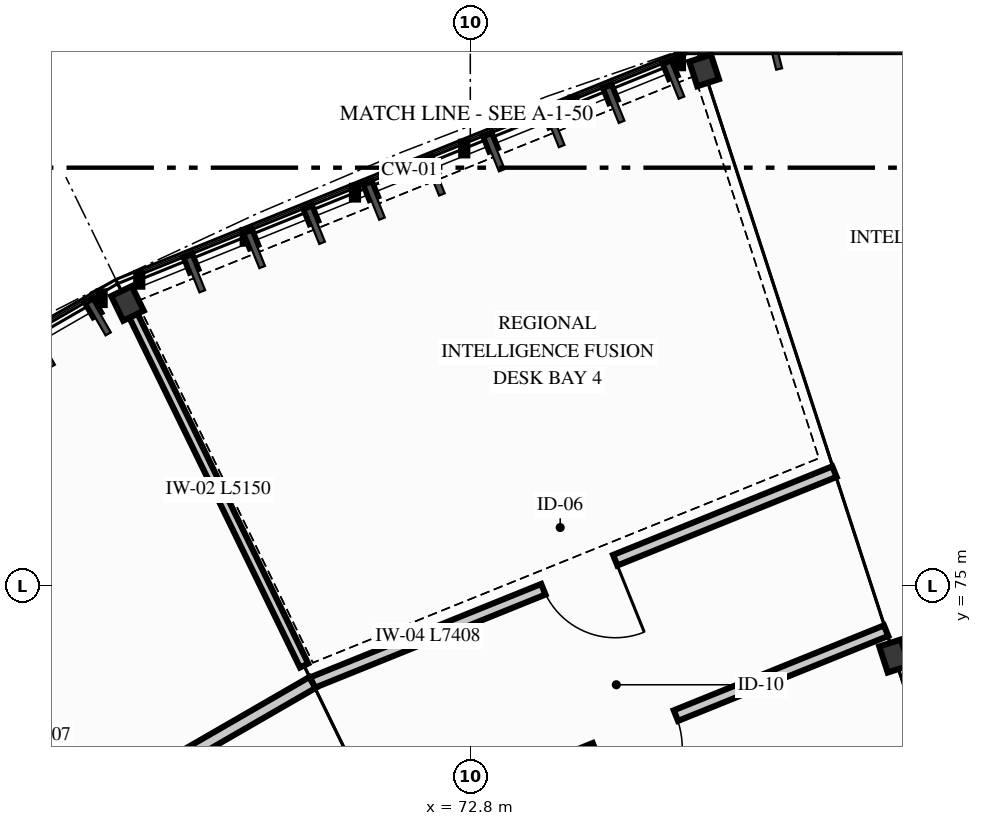
"""IFC4 building model, lengths in metres.
Left out: names, types, materials, properties, quantities, classifications, styles, units other than length and angle.
Written with IfcOpenShell. Run it as: python <this file> out.ifc"""

import sys

from ifc_helpers import new_model, si_unit, direction, frame, frame_2d, origin, origin_2d, place, context, subcontext, project, spatial, rectangle, i_section, extrude, element, fill, save


model = new_model("IFC4")
c1 = context("Model", 3, precision=1e-05, world=origin(), true_north=direction((0.0, 1.0)))
c2 = subcontext(c1, "Body", "Model", "MODEL_VIEW")
j1 = project(units=[si_unit("LENGTHUNIT", "METRE"), si_unit("PLANEANGLEUNIT", "RADIAN")], contexts=[c1])
p1 = place(None, origin())
s1 = spatial("IfcSite", under=j1, at=p1, CompositionType="ELEMENT")
p2 = place(p1, origin())
s2 = spatial("IfcBuilding", under=s1, at=p2, CompositionType="ELEMENT")
p3 = place(p2, frame((0.0, 0.0, 17.7)))
s3 = spatial("IfcBuildingStorey", under=s2, at=p3, CompositionType="ELEMENT", Elevation=17.7)
p4 = place(p3, frame((78.379, 74.076, 0.0), z_axis=(0.0, 0.0, 1.0), x_axis=(0.951056516295, 0.309016994375, 0.0)))
e1 = element("IfcColumn", 1, at=p4, inside=s3, PredefinedType="COLUMN", context=c2, shape_type="SweptSolid", body=[
    extrude(i_section(OverallWidth=0.3, OverallDepth=0.36, WebThickness=0.012, FlangeThickness=0.022, FilletRadius=0.027, at=origin_2d()), origin(), (0.0, 0.0, 1.0), 3.9),
])
p5 = place(p3, frame((75.876, 81.78, 0.0), z_axis=(0.0, 0.0, 1.0), x_axis=(0.951056516295, 0.309016994375, 0.0)))
e2 = element("IfcColumn", 2, at=p5, inside=s3, PredefinedType="COLUMN", context=c2, shape_type="SweptSolid", body=[
    extrude(i_section(OverallWidth=0.3, OverallDepth=0.34, WebThickness=0.012, FlangeThickness=0.021, FilletRadius=0.027, at=origin_2d()), origin(), (0.0, 0.0, 1.0), 3.9),
])
p6 = place(p3, frame((68.29, 78.714, 0.0), z_axis=(0.0, 0.0, 1.0), x_axis=(0.898794046299, 0.438371146789, 0.0)))
e3 = element("IfcColumn", 3, at=p6, inside=s3, PredefinedType="COLUMN", context=c2, shape_type="SweptSolid", body=[
    extrude(i_section(OverallWidth=0.3, OverallDepth=0.36, WebThickness=0.012, FlangeThickness=0.022, FilletRadius=0.027, at=origin_2d()), origin(), (0.0, 0.0, 1.0), 3.9),
])
p7 = place(p3, frame((78.271, 74.409, 0.0), z_axis=(0.0, 0.0, 1.0), x_axis=(-0.927181218568, -0.374613117677, 0.0)))
e4 = element("IfcWall", 4, at=p7, inside=s3, PredefinedType="PARTITIONING", context=c2, shape_type="SweptSolid", body=[
    extrude(rectangle(XDim=7.101, YDim=0.15, at=frame_2d((3.551, 0.0))), origin(), (0.0, 0.0, 1.0), 3.68),
])
p8 = place(p7, frame((2.983, 0.0, 0.0)))
e5 = element("IfcOpeningElement", 5, at=p8, cuts=e4, PredefinedType="OPENING", context=c2, shape_type="SweptSolid", body=[
    extrude(rectangle(XDim=1.15, YDim=2.2, at=frame_2d((0.575, 1.1))), frame((0.0, 0.085, 0.0), z_axis=(0.0, -1.0, 0.0), x_axis=(1.0, 0.0, 0.0)), (0.0, 0.0, 1.0), 0.17),
])
p9 = place(p3, frame((77.591, 76.501, 0.0), z_axis=(0.0, 0.0, 1.0), x_axis=(-0.927187035022, -0.374598721418, 0.0)))
e6 = element("IfcWall", 6, at=p9, inside=s3, PredefinedType="PARTITIONING", context=c2, shape_type="SweptSolid", body=[
    extrude(rectangle(XDim=7.408, YDim=0.15, at=frame_2d((3.704, 0.0))), origin(), (0.0, 0.0, 1.0), 3.68),
])
p10 = place(p9, frame((3.111, 0.0, 0.0)))
e7 = element("IfcOpeningElement", 7, at=p10, cuts=e6, PredefinedType="OPENING", context=c2, shape_type="SweptSolid", body=[
    extrude(rectangle(XDim=1.02, YDim=2.18, at=frame_2d((0.51, 1.09))), frame((0.0, 0.085, 0.0), z_axis=(0.0, -1.0, 0.0), x_axis=(1.0, 0.0, 0.0)), (0.0, 0.0, 1.0), 0.17),
])
p11 = place(p3, frame((70.613, 73.951, 0.0), z_axis=(0.0, 0.0, 1.0), x_axis=(-0.438355450259, 0.898801701839, 0.0)))
e8 = element("IfcWall", 8, at=p11, inside=s3, PredefinedType="PARTITIONING", context=c2, shape_type="SweptSolid", body=[
    extrude(rectangle(XDim=5.15, YDim=0.12, at=frame_2d((2.575, 0.0))), origin(), (0.0, 0.0, 1.0), 3.25),
])
p12 = place(p3, frame((70.722, 73.726, 0.0), z_axis=(0.0, 0.0, 1.0), x_axis=(-0.866019843608, -0.500009630384, 0.0)))
e9 = element("IfcWall", 9, at=p12, inside=s3, PredefinedType="PARTITIONING", context=c2, shape_type="SweptSolid", body=[
    extrude(rectangle(XDim=7.408, YDim=0.165, at=frame_2d((3.704, 0.0))), origin(), (0.0, 0.0, 1.0), 3.68),
])
p13 = place(p12, frame((3.111, 0.0, 0.0)))
e10 = element("IfcOpeningElement", 10, at=p13, cuts=e9, PredefinedType="OPENING", context=c2, shape_type="SweptSolid", body=[
    extrude(rectangle(XDim=1.05, YDim=2.2, at=frame_2d((0.525, 1.1))), frame((0.0, 0.093, 0.0), z_axis=(0.0, -1.0, 0.0), x_axis=(1.0, 0.0, 0.0)), (0.0, 0.0, 1.0), 0.185),
])
p14 = place(p8, origin())
e11 = element("IfcDoor", 11, at=p14, inside=s3, OperationType="SINGLE_SWING_RIGHT", PredefinedType="DOOR", context=c2, shape_type="SweptSolid", body=[
    extrude(rectangle(XDim=1.15, YDim=2.2, at=frame_2d((0.575, 1.1))), frame((0.0, 0.025, 0.0), z_axis=(0.0, -1.0, 0.0), x_axis=(1.0, 0.0, 0.0)), (0.0, 0.0, 1.0), 0.05),
])
fill(e5, e11)
p15 = place(p10, origin())
e12 = element("IfcDoor", 12, at=p15, inside=s3, OperationType="SINGLE_SWING_LEFT", PredefinedType="DOOR", context=c2, shape_type="SweptSolid", body=[
    extrude(rectangle(XDim=1.02, YDim=2.18, at=frame_2d((0.51, 1.09))), frame((0.0, 0.025, 0.0), z_axis=(0.0, -1.0, 0.0), x_axis=(1.0, 0.0, 0.0)), (0.0, 0.0, 1.0), 0.05),
])
fill(e7, e12)
save(model, sys.argv[1])
